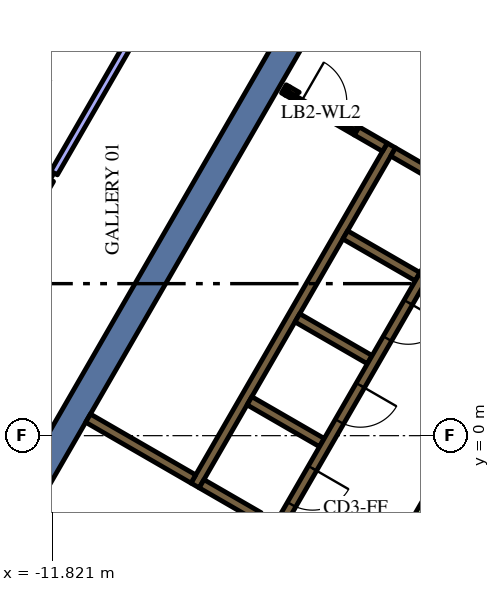
"""IFC4 building model, lengths in metres.
Left out: names, types, materials, properties, quantities, classifications, styles, units other than length and angle.
Written with IfcOpenShell. Run it as: python <this file> out.ifc"""

import sys

from ifc_helpers import new_model, si_unit, direction, frame, frame_2d, origin, place, context, subcontext, project, spatial, polyline, rectangle, outline, extrude, element, fill, save


model = new_model("IFC4")
c1 = context("Model", 3, precision=1e-05, world=origin(), true_north=direction((0.0, 1.0)))
c2 = subcontext(c1, "Body", "Model", "MODEL_VIEW")
j1 = project(units=[si_unit("LENGTHUNIT", "METRE"), si_unit("PLANEANGLEUNIT", "RADIAN")], contexts=[c1])
p1 = place(None, origin())
s1 = spatial("IfcSite", under=j1, at=p1, CompositionType="ELEMENT")
p2 = place(p1, origin())
s2 = spatial("IfcBuilding", under=s1, at=p2, CompositionType="ELEMENT")
p3 = place(p2, frame((0.0, 0.0, 226.8)))
s3 = spatial("IfcBuildingStorey", under=s2, at=p3, CompositionType="ELEMENT", Elevation=226.8)
p4 = place(p3, frame((-12.625, -1.867, 0.0), z_axis=(0.0, 0.0, 1.0), x_axis=(0.500008520515, 0.866020484407, 0.0)))
e1 = element("IfcWall", 1, at=p4, inside=s3, PredefinedType="SOLIDWALL", context=c2, shape_type="SweptSolid", body=[
    extrude(rectangle(XDim=15.859, YDim=0.7, at=frame_2d((7.929, 0.0))), origin(), (0.0, 0.0, 1.0), 4.2),
])
p5 = place(p3, frame((-8.06, -1.311, 0.0), z_axis=(0.0, 0.0, 1.0), x_axis=(0.50000273126, 0.866023826885, 0.0)))
e2 = element("IfcWall", 2, at=p5, inside=s3, PredefinedType="SOLIDWALL", context=c2, shape_type="SweptSolid", body=[
    extrude(rectangle(XDim=10.33, YDim=0.25, at=frame_2d((5.165, 0.0))), origin(), (0.0, 0.0, 1.0), 4.2),
])
p6 = place(p3, origin())
e3 = element("IfcWall", 3, at=p6, inside=s3, PredefinedType="SOLIDWALL", context=c2, shape_type="SweptSolid", body=[
    extrude(outline(polyline([(-2.912, 7.356), (-2.787, 7.573), (-1.232, 6.675), (-1.303, 6.675), (-1.304, 6.675), (-1.304, 6.675), (-1.304, 6.525), (-1.304, 6.525), (-1.303, 6.525), (-0.971, 6.525), (-0.665, 6.348), (-0.79, 6.132), (-1.007, 6.257), (-1.007, 6.257), (-2.912, 7.356)])), origin(), (0.0, 0.0, 1.0), 4.2),
])
for number, where, z_axis, x_axis in (
    (4, (-2.204, 4.182, 0.0), (0.0, 0.0, 1.0), (-0.866, 0.5, 0.0)),
    (5, (-5.369, 3.1, 0.0), (0.0, 0.0, 1.0), (0.866, -0.5, 0.0)),
    (6, (-4.724, -0.182, 0.0), (0.0, 0.0, 1.0), (-0.866, 0.5, 0.0)),
):
    element("IfcWall", number, at=place(p3, frame(where, z_axis=z_axis, x_axis=x_axis)), inside=s3, PredefinedType="SOLIDWALL", context=c2, shape_type="SweptSolid", body=[
        extrude(rectangle(XDim=2.2, YDim=0.25, at=frame_2d((1.1, 0.0))), origin(), (0.0, 0.0, 1.0), 4.2),
    ])
p7 = place(p3, frame((-7.889, -1.265, 0.0), z_axis=(0.0, 0.0, 1.0), x_axis=(0.865986741702, -0.500066958712, 0.0)))
e7 = element("IfcWall", 7, at=p7, inside=s3, PredefinedType="SOLIDWALL", context=c2, shape_type="SweptSolid", body=[
    extrude(rectangle(XDim=1.738, YDim=0.25, at=frame_2d((0.869, 0.0))), origin(), (0.0, 0.0, 1.0), 4.2),
])
p8 = place(p3, frame((-8.106, -1.14, 0.0), z_axis=(0.0, 0.0, 1.0), x_axis=(-0.866008981251, 0.500028443584, 0.0)))
e8 = element("IfcWall", 8, at=p8, inside=s3, PredefinedType="SOLIDWALL", context=c2, shape_type="SweptSolid", body=[
    extrude(rectangle(XDim=3.2, YDim=0.25, at=frame_2d((1.6, 0.0))), origin(), (0.0, 0.0, 1.0), 4.2),
])
p9 = place(p3, frame((-5.725, 9.125, 0.0), z_axis=(0.0, 0.0, 1.0), x_axis=(0.866185586049, -0.49972245349, 0.0)))
e9 = element("IfcWall", 9, at=p9, inside=s3, PredefinedType="SOLIDWALL", context=c2, shape_type="SweptSolid", body=[
    extrude(rectangle(XDim=0.11, YDim=0.25, at=frame_2d((0.055, 0.0))), origin(), (0.0, 0.0, 1.0), 4.2),
])
p10 = place(p3, frame((-3.066, 7.59, 0.0), z_axis=(0.0, 0.0, 1.0), x_axis=(-0.866081358704, 0.49990307071, 0.0)))
e10 = element("IfcWall", 10, at=p10, inside=s3, PredefinedType="SOLIDWALL", context=c2, shape_type="SweptSolid", body=[
    extrude(rectangle(XDim=0.858, YDim=0.25, at=frame_2d((0.429, 0.0))), origin(), (0.0, 0.0, 1.0), 4.2),
])
e11 = element("IfcWall", 11, at=p6, inside=s3, PredefinedType="SOLIDWALL", context=c2, shape_type="SweptSolid", body=[
    extrude(outline(polyline([(-3.748, 8.128), (-3.813, 8.015), (-4.027, 8.139), (-4.017, 8.156), (-4.008, 8.173), (-4.0, 8.192), (-3.995, 8.21), (-3.991, 8.23), (-3.99, 8.25), (-3.99, 8.268), (-3.748, 8.128)])), origin(), (0.0, 0.0, 1.0), 4.2),
])
e12 = element("IfcWall", 12, at=p6, inside=s3, PredefinedType="SOLIDWALL", context=c2, shape_type="SweptSolid", body=[
    extrude(outline(polyline([(-5.689, 8.96), (-5.69, 8.961), (-5.565, 9.177), (-5.319, 9.035), (-5.335, 9.026), (-5.351, 9.015), (-5.366, 9.002), (-5.379, 8.988), (-5.392, 8.972), (-5.402, 8.956), (-5.412, 8.939), (-5.629, 9.064), (-5.629, 9.064), (-5.689, 8.96)])), origin(), (0.0, 0.0, 1.0), 4.2),
])
p11 = place(p3, frame((-3.147, -3.718, 0.0), z_axis=(0.0, 0.0, 1.0), x_axis=(0.500010131483, 0.866019554291, 0.0)))
e13 = element("IfcWall", 13, at=p11, inside=s3, PredefinedType="PARTITIONING", context=c2, shape_type="SweptSolid", body=[
    extrude(rectangle(XDim=3.894, YDim=0.15, at=frame_2d((1.947, 0.0))), origin(), (0.0, 0.0, 1.0), 3.45),
])
p12 = place(p3, frame((-0.898, 6.194, 0.0), z_axis=(0.0, 0.0, 1.0), x_axis=(-0.499996202215, -0.866027596426, 0.0)))
e14 = element("IfcWall", 14, at=p12, inside=s3, PredefinedType="SOLIDWALL", context=c2, shape_type="SweptSolid", body=[
    extrude(rectangle(XDim=9.83, YDim=0.25, at=frame_2d((4.915, 0.0))), origin(), (0.0, 0.0, 1.0), 4.2),
])
p13 = place(p12, frame((0.585, 0.0, 0.0)))
e15 = element("IfcOpeningElement", 15, at=p13, cuts=e14, PredefinedType="OPENING", context=c2, shape_type="SweptSolid", body=[
    extrude(rectangle(XDim=1.1, YDim=2.1, at=frame_2d((0.55, 1.05))), frame((0.0, 0.135, 0.0), z_axis=(0.0, -1.0, 0.0), x_axis=(1.0, 0.0, 0.0)), (0.0, 0.0, 1.0), 0.27),
])
p14 = place(p12, frame((3.105, 0.0, 0.0)))
e16 = element("IfcOpeningElement", 16, at=p14, cuts=e14, PredefinedType="OPENING", context=c2, shape_type="SweptSolid", body=[
    extrude(rectangle(XDim=1.1, YDim=2.1, at=frame_2d((0.55, 1.05))), frame((0.0, 0.135, 0.0), z_axis=(0.0, -1.0, 0.0), x_axis=(1.0, 0.0, 0.0)), (0.0, 0.0, 1.0), 0.27),
])
p15 = place(p12, frame((5.625, 0.0, 0.0)))
e17 = element("IfcOpeningElement", 17, at=p15, cuts=e14, PredefinedType="OPENING", context=c2, shape_type="SweptSolid", body=[
    extrude(rectangle(XDim=1.1, YDim=2.1, at=frame_2d((0.55, 1.05))), frame((0.0, 0.135, 0.0), z_axis=(0.0, -1.0, 0.0), x_axis=(1.0, 0.0, 0.0)), (0.0, 0.0, 1.0), 0.27),
])
p16 = place(p12, frame((8.145, 0.0, 0.0)))
e18 = element("IfcOpeningElement", 18, at=p16, cuts=e14, PredefinedType="OPENING", context=c2, shape_type="SweptSolid", body=[
    extrude(rectangle(XDim=1.1, YDim=2.1, at=frame_2d((0.55, 1.05))), frame((0.0, 0.135, 0.0), z_axis=(0.0, -1.0, 0.0), x_axis=(1.0, 0.0, 0.0)), (0.0, 0.0, 1.0), 0.27),
])
p17 = place(p3, frame((-5.659, 9.012, 0.0), z_axis=(0.0, 0.0, 1.0), x_axis=(0.866009402589, -0.500027713859, 0.0)))
e19 = element("IfcWall", 19, at=p17, inside=s3, PredefinedType="PARTITIONING", context=c2, shape_type="SweptSolid", body=[
    extrude(rectangle(XDim=2.1, YDim=0.12, at=frame_2d((1.05, 0.0))), origin(), (0.0, 0.0, 1.0), 3.45),
])
p18 = place(p17, frame((0.45, 0.0, 0.0)))
e20 = element("IfcOpeningElement", 20, at=p18, cuts=e19, PredefinedType="OPENING", context=c2, shape_type="SweptSolid", body=[
    extrude(rectangle(XDim=1.2, YDim=2.1, at=frame_2d((0.6, 1.05))), frame((0.0, 0.07, 0.0), z_axis=(0.0, -1.0, 0.0), x_axis=(1.0, 0.0, 0.0)), (0.0, 0.0, 1.0), 0.14),
])
p19 = place(p3, frame((-11.821, 6.825, 0.0), z_axis=(0.0, 0.0, 1.0), x_axis=(-0.866011792348, 0.500023574959, 0.0)))
e21 = element("IfcWall", 21, at=p19, inside=s3, PredefinedType="PARTITIONING", context=c2, shape_type="SweptSolid", body=[
    extrude(rectangle(XDim=5.381, YDim=0.2, at=frame_2d((2.69, 0.0))), origin(), (0.0, 0.0, 1.0), 3.45),
])
p20 = place(p3, frame((-7.061, 15.069, 0.0), z_axis=(0.0, 0.0, 1.0), x_axis=(-0.500008127286, -0.866020711443, 0.0)))
e22 = element("IfcWall", 22, at=p20, inside=s3, PredefinedType="PARTITIONING", context=c2, shape_type="SweptSolid", body=[
    extrude(rectangle(XDim=9.42, YDim=0.2, at=frame_2d((4.71, 0.0))), origin(), (0.0, 0.0, 1.0), 3.45),
])
p21 = place(p20, frame((4.2, 0.0, 0.0)))
e23 = element("IfcOpeningElement", 23, at=p21, cuts=e22, PredefinedType="OPENING", context=c2, shape_type="SweptSolid", body=[
    extrude(rectangle(XDim=1.0, YDim=2.1, at=frame_2d((0.5, 1.05))), frame((0.0, 0.11, 0.0), z_axis=(0.0, -1.0, 0.0), x_axis=(1.0, 0.0, 0.0)), (0.0, 0.0, 1.0), 0.22),
])
p22 = place(p3, frame((-11.871, 6.738, 0.0), z_axis=(0.0, 0.0, 1.0), x_axis=(-0.500019350398, -0.866014231539, 0.0)))
e24 = element("IfcWall", 24, at=p22, inside=s3, PredefinedType="PARTITIONING", context=c2, shape_type="SweptSolid", body=[
    extrude(rectangle(XDim=9.42, YDim=0.2, at=frame_2d((4.71, 0.0))), origin(), (0.0, 0.0, 1.0), 3.45),
])
p23 = place(p22, frame((4.2, 0.0, 0.0)))
e25 = element("IfcOpeningElement", 25, at=p23, cuts=e24, PredefinedType="OPENING", context=c2, shape_type="SweptSolid", body=[
    extrude(rectangle(XDim=1.0, YDim=2.1, at=frame_2d((0.5, 1.05))), frame((0.0, 0.11, 0.0), z_axis=(0.0, -1.0, 0.0), x_axis=(1.0, 0.0, 0.0)), (0.0, 0.0, 1.0), 0.22),
])
p24 = place(p14, origin())
e26 = element("IfcDoor", 26, at=p24, inside=s3, OperationType="DOUBLE_DOOR_SLIDING", PredefinedType="DOOR", context=c2, shape_type="SweptSolid", body=[
    extrude(rectangle(XDim=1.1, YDim=2.1, at=frame_2d((0.55, 1.05))), frame((0.0, 0.025, 0.0), z_axis=(0.0, -1.0, 0.0), x_axis=(1.0, 0.0, 0.0)), (0.0, 0.0, 1.0), 0.05),
])
fill(e16, e26)
p25 = place(p15, origin())
e27 = element("IfcDoor", 27, at=p25, inside=s3, OperationType="DOUBLE_DOOR_SLIDING", PredefinedType="DOOR", context=c2, shape_type="SweptSolid", body=[
    extrude(rectangle(XDim=1.1, YDim=2.1, at=frame_2d((0.55, 1.05))), frame((0.0, 0.025, 0.0), z_axis=(0.0, -1.0, 0.0), x_axis=(1.0, 0.0, 0.0)), (0.0, 0.0, 1.0), 0.05),
])
fill(e17, e27)
p26 = place(p16, origin())
e28 = element("IfcDoor", 28, at=p26, inside=s3, OperationType="DOUBLE_DOOR_SLIDING", PredefinedType="DOOR", context=c2, shape_type="SweptSolid", body=[
    extrude(rectangle(XDim=1.1, YDim=2.1, at=frame_2d((0.55, 1.05))), frame((0.0, 0.025, 0.0), z_axis=(0.0, -1.0, 0.0), x_axis=(1.0, 0.0, 0.0)), (0.0, 0.0, 1.0), 0.05),
])
fill(e18, e28)
p27 = place(p18, origin())
e29 = element("IfcDoor", 29, at=p27, inside=s3, OperationType="SINGLE_SWING_LEFT", PredefinedType="DOOR", context=c2, shape_type="SweptSolid", body=[
    extrude(rectangle(XDim=1.2, YDim=2.1, at=frame_2d((0.6, 1.05))), frame((0.0, 0.025, 0.0), z_axis=(0.0, -1.0, 0.0), x_axis=(1.0, 0.0, 0.0)), (0.0, 0.0, 1.0), 0.05),
])
fill(e20, e29)
save(model, sys.argv[1])
